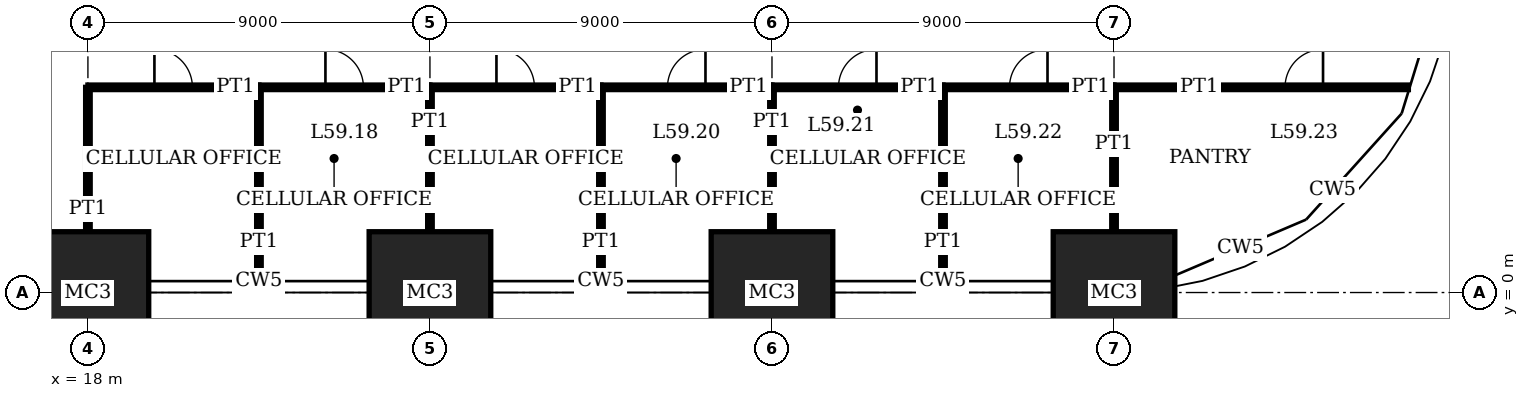
"""IFC4 building model, lengths in metres.
Left out: names, types, materials, properties, quantities, classifications, styles, units other than length and angle.
Written with IfcOpenShell. Run it as: python <this file> out.ifc"""

import sys

from ifc_helpers import new_model, si_unit, direction, frame, frame_2d, origin, origin_2d, place, context, subcontext, project, spatial, rectangle, extrude, element, fill, save


model = new_model("IFC4")
c1 = context("Model", 3, precision=1e-05, world=origin(), true_north=direction((0.0, 1.0)))
c2 = subcontext(c1, "Body", "Model", "MODEL_VIEW")
j1 = project(units=[si_unit("LENGTHUNIT", "METRE"), si_unit("PLANEANGLEUNIT", "RADIAN")], contexts=[c1])
p1 = place(None, origin())
s1 = spatial("IfcSite", under=j1, at=p1, CompositionType="ELEMENT")
p2 = place(p1, origin())
s2 = spatial("IfcBuilding", under=s1, at=p2, CompositionType="ELEMENT")
p3 = place(p2, frame((0.0, 0.0, 243.4)))
s3 = spatial("IfcBuildingStorey", under=s2, at=p3, CompositionType="ELEMENT", Elevation=243.4)
for number, where, z_axis, x_axis in (
    (1, (18.0, 0.0, 0.0), (0.0, 0.0, 1.0), (1.0, 0.0, 0.0)),
    (2, (27.0, 0.0, 0.0), (0.0, 0.0, 1.0), (1.0, 0.0, 0.0)),
    (3, (36.0, 0.0, 0.0), (0.0, 0.0, 1.0), (1.0, 0.0, 0.0)),
    (4, (45.0, 0.0, 0.0), (0.0, 0.0, 1.0), (1.0, 0.0, 0.0)),
):
    element("IfcColumn", number, at=place(p3, frame(where, z_axis=z_axis, x_axis=x_axis)), inside=s3, PredefinedType="COLUMN", context=c2, shape_type="SweptSolid", body=[
        extrude(rectangle(XDim=3.2, YDim=3.2, at=origin_2d()), origin(), (0.0, 0.0, 1.0), 4.0),
    ])
p4 = place(p3, frame((18.0, 5.4, 0.0), z_axis=(0.0, 0.0, 1.0), x_axis=(1.0, 0.0, 0.0)))
e5 = element("IfcWall", 5, at=p4, inside=s3, PredefinedType="PARTITIONING", context=c2, shape_type="SweptSolid", body=[
    extrude(rectangle(XDim=4.5, YDim=0.12, at=frame_2d((2.25, 0.0))), origin(), (0.0, 0.0, 1.0), 3.75),
])
p5 = place(p4, frame((1.75, 0.0, 0.0)))
e6 = element("IfcOpeningElement", 6, at=p5, cuts=e5, PredefinedType="OPENING", context=c2, shape_type="SweptSolid", body=[
    extrude(rectangle(XDim=1.0, YDim=2.4, at=frame_2d((0.5, 1.2))), frame((0.0, 0.07, 0.0), z_axis=(0.0, -1.0, 0.0), x_axis=(1.0, 0.0, 0.0)), (0.0, 0.0, 1.0), 0.14),
])
p6 = place(p3, frame((22.5, 5.4, 0.0), z_axis=(0.0, 0.0, 1.0), x_axis=(1.0, 0.0, 0.0)))
e7 = element("IfcWall", 7, at=p6, inside=s3, PredefinedType="PARTITIONING", context=c2, shape_type="SweptSolid", body=[
    extrude(rectangle(XDim=4.5, YDim=0.12, at=frame_2d((2.25, 0.0))), origin(), (0.0, 0.0, 1.0), 3.75),
])
p7 = place(p6, frame((1.75, 0.0, 0.0)))
e8 = element("IfcOpeningElement", 8, at=p7, cuts=e7, PredefinedType="OPENING", context=c2, shape_type="SweptSolid", body=[
    extrude(rectangle(XDim=1.0, YDim=2.4, at=frame_2d((0.5, 1.2))), frame((0.0, 0.07, 0.0), z_axis=(0.0, -1.0, 0.0), x_axis=(1.0, 0.0, 0.0)), (0.0, 0.0, 1.0), 0.14),
])
p8 = place(p3, frame((27.0, 5.4, 0.0), z_axis=(0.0, 0.0, 1.0), x_axis=(1.0, 0.0, 0.0)))
e9 = element("IfcWall", 9, at=p8, inside=s3, PredefinedType="PARTITIONING", context=c2, shape_type="SweptSolid", body=[
    extrude(rectangle(XDim=4.5, YDim=0.12, at=frame_2d((2.25, 0.0))), origin(), (0.0, 0.0, 1.0), 3.75),
])
p9 = place(p8, frame((1.75, 0.0, 0.0)))
e10 = element("IfcOpeningElement", 10, at=p9, cuts=e9, PredefinedType="OPENING", context=c2, shape_type="SweptSolid", body=[
    extrude(rectangle(XDim=1.0, YDim=2.4, at=frame_2d((0.5, 1.2))), frame((0.0, 0.07, 0.0), z_axis=(0.0, -1.0, 0.0), x_axis=(1.0, 0.0, 0.0)), (0.0, 0.0, 1.0), 0.14),
])
p10 = place(p3, frame((31.5, 5.4, 0.0), z_axis=(0.0, 0.0, 1.0), x_axis=(1.0, 0.0, 0.0)))
e11 = element("IfcWall", 11, at=p10, inside=s3, PredefinedType="PARTITIONING", context=c2, shape_type="SweptSolid", body=[
    extrude(rectangle(XDim=4.5, YDim=0.12, at=frame_2d((2.25, 0.0))), origin(), (0.0, 0.0, 1.0), 3.75),
])
p11 = place(p10, frame((1.75, 0.0, 0.0)))
e12 = element("IfcOpeningElement", 12, at=p11, cuts=e11, PredefinedType="OPENING", context=c2, shape_type="SweptSolid", body=[
    extrude(rectangle(XDim=1.0, YDim=2.4, at=frame_2d((0.5, 1.2))), frame((0.0, 0.07, 0.0), z_axis=(0.0, -1.0, 0.0), x_axis=(1.0, 0.0, 0.0)), (0.0, 0.0, 1.0), 0.14),
])
p12 = place(p3, frame((36.0, 5.4, 0.0), z_axis=(0.0, 0.0, 1.0), x_axis=(1.0, 0.0, 0.0)))
e13 = element("IfcWall", 13, at=p12, inside=s3, PredefinedType="PARTITIONING", context=c2, shape_type="SweptSolid", body=[
    extrude(rectangle(XDim=4.5, YDim=0.12, at=frame_2d((2.25, 0.0))), origin(), (0.0, 0.0, 1.0), 3.75),
])
p13 = place(p12, frame((1.75, 0.0, 0.0)))
e14 = element("IfcOpeningElement", 14, at=p13, cuts=e13, PredefinedType="OPENING", context=c2, shape_type="SweptSolid", body=[
    extrude(rectangle(XDim=1.0, YDim=2.4, at=frame_2d((0.5, 1.2))), frame((0.0, 0.07, 0.0), z_axis=(0.0, -1.0, 0.0), x_axis=(1.0, 0.0, 0.0)), (0.0, 0.0, 1.0), 0.14),
])
p14 = place(p3, frame((40.5, 5.4, 0.0), z_axis=(0.0, 0.0, 1.0), x_axis=(1.0, 0.0, 0.0)))
e15 = element("IfcWall", 15, at=p14, inside=s3, PredefinedType="PARTITIONING", context=c2, shape_type="SweptSolid", body=[
    extrude(rectangle(XDim=4.5, YDim=0.12, at=frame_2d((2.25, 0.0))), origin(), (0.0, 0.0, 1.0), 3.75),
])
p15 = place(p14, frame((1.75, 0.0, 0.0)))
e16 = element("IfcOpeningElement", 16, at=p15, cuts=e15, PredefinedType="OPENING", context=c2, shape_type="SweptSolid", body=[
    extrude(rectangle(XDim=1.0, YDim=2.4, at=frame_2d((0.5, 1.2))), frame((0.0, 0.07, 0.0), z_axis=(0.0, -1.0, 0.0), x_axis=(1.0, 0.0, 0.0)), (0.0, 0.0, 1.0), 0.14),
])
p16 = place(p3, frame((45.0, 5.4, 0.0), z_axis=(0.0, 0.0, 1.0), x_axis=(1.0, 0.0, 0.0)))
e17 = element("IfcWall", 17, at=p16, inside=s3, PredefinedType="PARTITIONING", context=c2, shape_type="SweptSolid", body=[
    extrude(rectangle(XDim=7.746, YDim=0.12, at=frame_2d((3.873, 0.0))), origin(), (0.0, 0.0, 1.0), 3.75),
])
p17 = place(p16, frame((4.5, 0.0, 0.0)))
e18 = element("IfcOpeningElement", 18, at=p17, cuts=e17, PredefinedType="OPENING", context=c2, shape_type="SweptSolid", body=[
    extrude(rectangle(XDim=1.0, YDim=2.4, at=frame_2d((0.5, 1.2))), frame((0.0, 0.07, 0.0), z_axis=(0.0, -1.0, 0.0), x_axis=(1.0, 0.0, 0.0)), (0.0, 0.0, 1.0), 0.14),
])
p18 = place(p3, frame((18.0, 1.6, 0.0), z_axis=(0.0, 0.0, 1.0), x_axis=(0.0, 1.0, 0.0)))
e19 = element("IfcWall", 19, at=p18, inside=s3, PredefinedType="PARTITIONING", context=c2, shape_type="SweptSolid", body=[
    extrude(rectangle(XDim=3.8, YDim=0.12, at=frame_2d((1.9, 0.0))), origin(), (0.0, 0.0, 1.0), 3.05),
])
p19 = place(p3, frame((22.5, 0.31, 0.0), z_axis=(0.0, 0.0, 1.0), x_axis=(0.0, 1.0, 0.0)))
e20 = element("IfcWall", 20, at=p19, inside=s3, PredefinedType="PARTITIONING", context=c2, shape_type="SweptSolid", body=[
    extrude(rectangle(XDim=5.09, YDim=0.12, at=frame_2d((2.545, 0.0))), origin(), (0.0, 0.0, 1.0), 3.75),
])
p20 = place(p3, frame((27.0, 1.6, 0.0), z_axis=(0.0, 0.0, 1.0), x_axis=(0.0, 1.0, 0.0)))
e21 = element("IfcWall", 21, at=p20, inside=s3, PredefinedType="PARTITIONING", context=c2, shape_type="SweptSolid", body=[
    extrude(rectangle(XDim=3.8, YDim=0.12, at=frame_2d((1.9, 0.0))), origin(), (0.0, 0.0, 1.0), 3.05),
])
p21 = place(p3, frame((31.5, 0.31, 0.0), z_axis=(0.0, 0.0, 1.0), x_axis=(0.0, 1.0, 0.0)))
e22 = element("IfcWall", 22, at=p21, inside=s3, PredefinedType="PARTITIONING", context=c2, shape_type="SweptSolid", body=[
    extrude(rectangle(XDim=5.09, YDim=0.12, at=frame_2d((2.545, 0.0))), origin(), (0.0, 0.0, 1.0), 3.75),
])
p22 = place(p3, frame((36.0, 1.6, 0.0), z_axis=(0.0, 0.0, 1.0), x_axis=(0.0, 1.0, 0.0)))
e23 = element("IfcWall", 23, at=p22, inside=s3, PredefinedType="PARTITIONING", context=c2, shape_type="SweptSolid", body=[
    extrude(rectangle(XDim=3.8, YDim=0.12, at=frame_2d((1.9, 0.0))), origin(), (0.0, 0.0, 1.0), 3.05),
])
p23 = place(p3, frame((40.5, 0.31, 0.0), z_axis=(0.0, 0.0, 1.0), x_axis=(0.0, 1.0, 0.0)))
e24 = element("IfcWall", 24, at=p23, inside=s3, PredefinedType="PARTITIONING", context=c2, shape_type="SweptSolid", body=[
    extrude(rectangle(XDim=5.09, YDim=0.12, at=frame_2d((2.545, 0.0))), origin(), (0.0, 0.0, 1.0), 3.75),
])
p24 = place(p3, frame((45.0, 1.6, 0.0), z_axis=(0.0, 0.0, 1.0), x_axis=(0.0, 1.0, 0.0)))
e25 = element("IfcWall", 25, at=p24, inside=s3, PredefinedType="PARTITIONING", context=c2, shape_type="SweptSolid", body=[
    extrude(rectangle(XDim=3.8, YDim=0.12, at=frame_2d((1.9, 0.0))), origin(), (0.0, 0.0, 1.0), 3.05),
])
p25 = place(p5, origin())
e26 = element("IfcDoor", 26, at=p25, inside=s3, OperationType="SINGLE_SWING_RIGHT", PredefinedType="DOOR", context=c2, shape_type="SweptSolid", body=[
    extrude(rectangle(XDim=1.0, YDim=2.4, at=frame_2d((0.5, 1.2))), frame((0.0, 0.025, 0.0), z_axis=(0.0, -1.0, 0.0), x_axis=(1.0, 0.0, 0.0)), (0.0, 0.0, 1.0), 0.05),
])
fill(e6, e26)
p26 = place(p7, origin())
e27 = element("IfcDoor", 27, at=p26, inside=s3, OperationType="SINGLE_SWING_RIGHT", PredefinedType="DOOR", context=c2, shape_type="SweptSolid", body=[
    extrude(rectangle(XDim=1.0, YDim=2.4, at=frame_2d((0.5, 1.2))), frame((0.0, 0.025, 0.0), z_axis=(0.0, -1.0, 0.0), x_axis=(1.0, 0.0, 0.0)), (0.0, 0.0, 1.0), 0.05),
])
fill(e8, e27)
p27 = place(p9, origin())
e28 = element("IfcDoor", 28, at=p27, inside=s3, OperationType="SINGLE_SWING_RIGHT", PredefinedType="DOOR", context=c2, shape_type="SweptSolid", body=[
    extrude(rectangle(XDim=1.0, YDim=2.4, at=frame_2d((0.5, 1.2))), frame((0.0, 0.025, 0.0), z_axis=(0.0, -1.0, 0.0), x_axis=(1.0, 0.0, 0.0)), (0.0, 0.0, 1.0), 0.05),
])
fill(e10, e28)
p28 = place(p11, origin())
e29 = element("IfcDoor", 29, at=p28, inside=s3, OperationType="SINGLE_SWING_LEFT", PredefinedType="DOOR", context=c2, shape_type="SweptSolid", body=[
    extrude(rectangle(XDim=1.0, YDim=2.4, at=frame_2d((0.5, 1.2))), frame((0.0, 0.025, 0.0), z_axis=(0.0, -1.0, 0.0), x_axis=(1.0, 0.0, 0.0)), (0.0, 0.0, 1.0), 0.05),
])
fill(e12, e29)
p29 = place(p13, origin())
e30 = element("IfcDoor", 30, at=p29, inside=s3, OperationType="SINGLE_SWING_LEFT", PredefinedType="DOOR", context=c2, shape_type="SweptSolid", body=[
    extrude(rectangle(XDim=1.0, YDim=2.4, at=frame_2d((0.5, 1.2))), frame((0.0, 0.025, 0.0), z_axis=(0.0, -1.0, 0.0), x_axis=(1.0, 0.0, 0.0)), (0.0, 0.0, 1.0), 0.05),
])
fill(e14, e30)
p30 = place(p15, origin())
e31 = element("IfcDoor", 31, at=p30, inside=s3, OperationType="SINGLE_SWING_LEFT", PredefinedType="DOOR", context=c2, shape_type="SweptSolid", body=[
    extrude(rectangle(XDim=1.0, YDim=2.4, at=frame_2d((0.5, 1.2))), frame((0.0, 0.025, 0.0), z_axis=(0.0, -1.0, 0.0), x_axis=(1.0, 0.0, 0.0)), (0.0, 0.0, 1.0), 0.05),
])
fill(e16, e31)
p31 = place(p17, origin())
e32 = element("IfcDoor", 32, at=p31, inside=s3, OperationType="SINGLE_SWING_LEFT", PredefinedType="DOOR", context=c2, shape_type="SweptSolid", body=[
    extrude(rectangle(XDim=1.0, YDim=2.4, at=frame_2d((0.5, 1.2))), frame((0.0, 0.025, 0.0), z_axis=(0.0, -1.0, 0.0), x_axis=(1.0, 0.0, 0.0)), (0.0, 0.0, 1.0), 0.05),
])
fill(e18, e32)
save(model, sys.argv[1])
